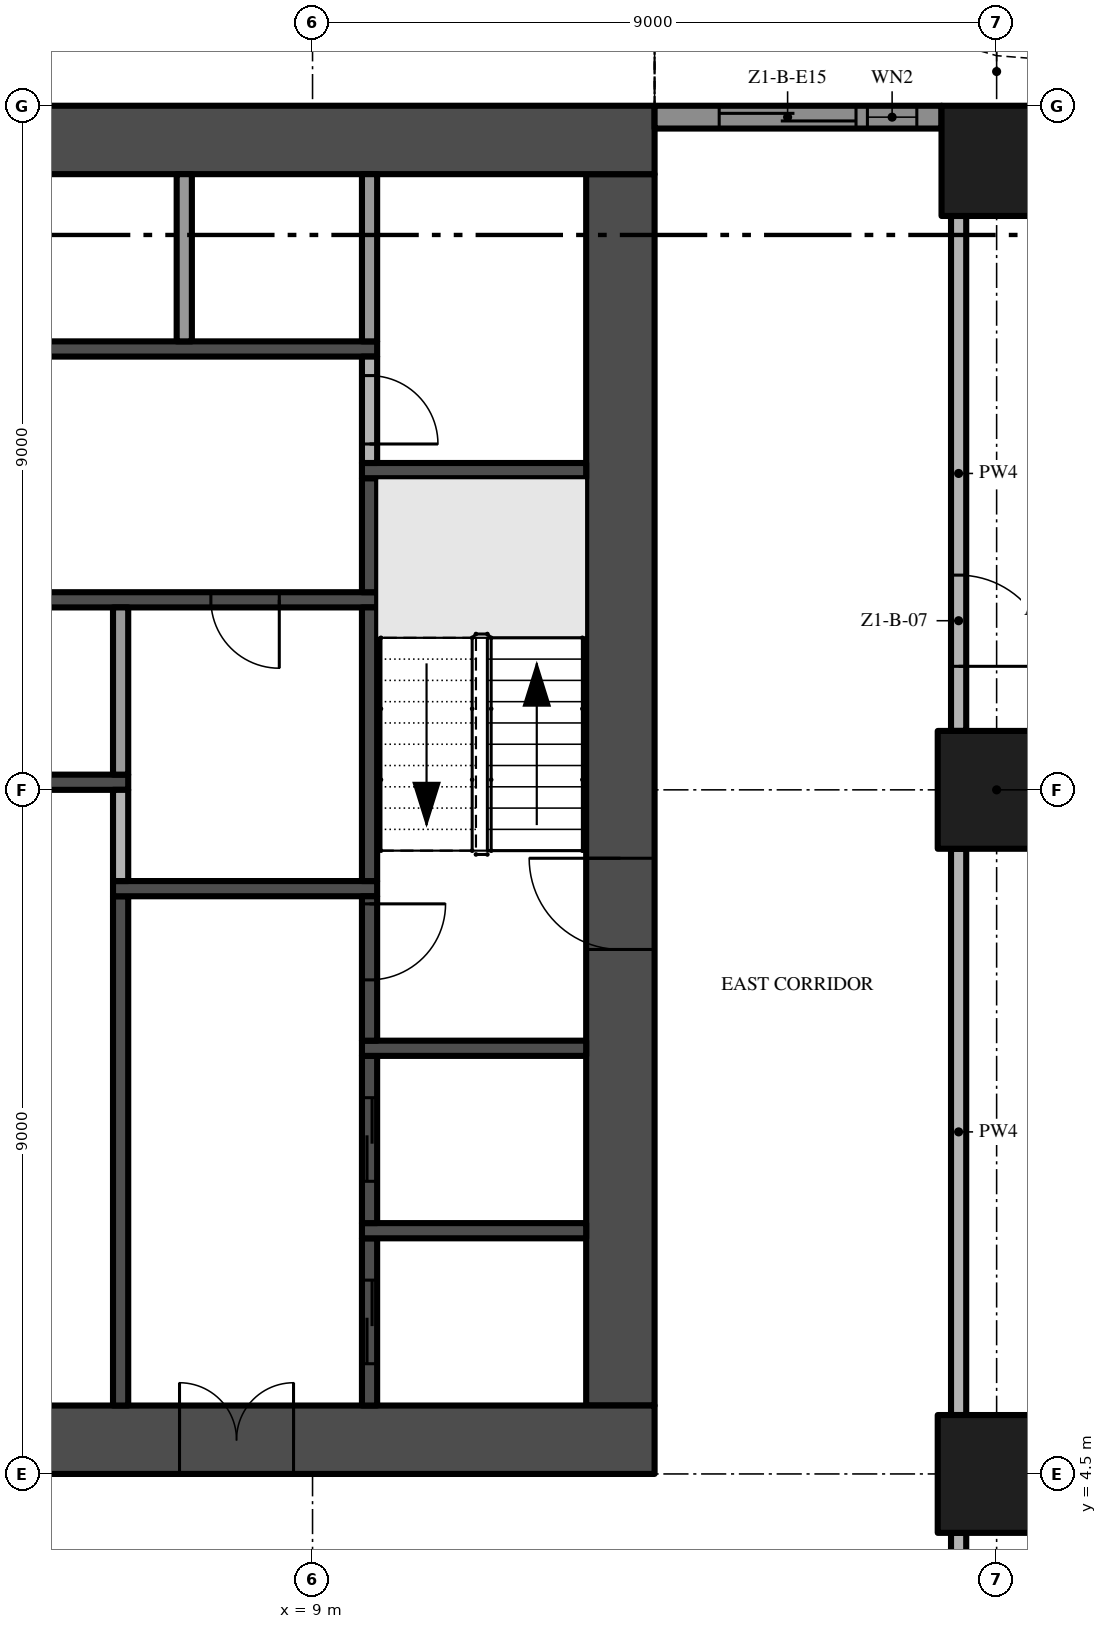
"""IFC4 building model, lengths in metres.
Left out: names, types, materials, properties, quantities, classifications, styles, units other than length and angle.
Written with IfcOpenShell. Run it as: python <this file> out.ifc"""

import sys

from ifc_helpers import new_model, si_unit, direction, frame, frame_2d, origin, origin_2d, place, context, subcontext, project, spatial, polyline, rectangle, outline, extrude, element, fill, save


model = new_model("IFC4")
c1 = context("Model", 3, precision=1e-05, world=origin(), true_north=direction((0.0, 1.0)))
c2 = subcontext(c1, "Body", "Model", "MODEL_VIEW")
j1 = project(units=[si_unit("LENGTHUNIT", "METRE"), si_unit("PLANEANGLEUNIT", "RADIAN")], contexts=[c1])
p1 = place(None, origin())
s1 = spatial("IfcSite", under=j1, at=p1, CompositionType="ELEMENT")
p2 = place(p1, origin())
s2 = spatial("IfcBuilding", under=s1, at=p2, CompositionType="ELEMENT")
p3 = place(p2, frame((0.0, 0.0, 30.2)))
s3 = spatial("IfcBuildingStorey", under=s2, at=p3, CompositionType="ELEMENT", Elevation=30.2)
p4 = place(p3, frame((-13.5, 4.95, -0.3), z_axis=(0.0, 0.0, 1.0), x_axis=(1.0, 0.0, 0.0)))
e1 = element("IfcWall", 1, at=p4, inside=s3, PredefinedType="SHEAR", context=c2, shape_type="SweptSolid", body=[
    extrude(rectangle(XDim=27.0, YDim=0.9, at=frame_2d((13.5, 0.0))), origin(), (0.0, 0.0, 1.0), 3.8),
])
p5 = place(p4, frame((12.0, 0.0, 0.3)))
e2 = element("IfcOpeningElement", 2, at=p5, cuts=e1, PredefinedType="OPENING", context=c2, shape_type="SweptSolid", body=[
    extrude(rectangle(XDim=3.0, YDim=2.4, at=frame_2d((1.5, 1.2))), frame((0.0, 0.46, 0.0), z_axis=(0.0, -1.0, 0.0), x_axis=(1.0, 0.0, 0.0)), (0.0, 0.0, 1.0), 0.92),
])
p6 = place(p4, frame((4.9, 0.0, 0.3)))
e3 = element("IfcOpeningElement", 3, at=p6, cuts=e1, PredefinedType="OPENING", context=c2, shape_type="SweptSolid", body=[
    extrude(rectangle(XDim=1.2, YDim=2.2, at=frame_2d((0.6, 1.1))), frame((0.0, 0.46, 0.0), z_axis=(0.0, -1.0, 0.0), x_axis=(1.0, 0.0, 0.0)), (0.0, 0.0, 1.0), 0.92),
])
p7 = place(p4, frame((20.75, 0.0, 0.3)))
e4 = element("IfcOpeningElement", 4, at=p7, cuts=e1, PredefinedType="OPENING", context=c2, shape_type="SweptSolid", body=[
    extrude(rectangle(XDim=1.5, YDim=2.2, at=frame_2d((0.75, 1.1))), frame((0.0, 0.46, 0.0), z_axis=(0.0, -1.0, 0.0), x_axis=(1.0, 0.0, 0.0)), (0.0, 0.0, 1.0), 0.92),
])
p8 = place(p4, frame((17.4, 0.0, 0.3)))
e5 = element("IfcOpeningElement", 5, at=p8, cuts=e1, PredefinedType="OPENING", context=c2, shape_type="SweptSolid", body=[
    extrude(rectangle(XDim=1.2, YDim=2.2, at=frame_2d((0.6, 1.1))), frame((0.0, 0.46, 0.0), z_axis=(0.0, -1.0, 0.0), x_axis=(1.0, 0.0, 0.0)), (0.0, 0.0, 1.0), 0.92),
])
p9 = place(p3, frame((13.05, 5.4, -0.3), z_axis=(0.0, 0.0, 1.0), x_axis=(0.0, 1.0, 0.0)))
e6 = element("IfcWall", 6, at=p9, inside=s3, PredefinedType="SHEAR", context=c2, shape_type="SweptSolid", body=[
    extrude(rectangle(XDim=16.2, YDim=0.9, at=frame_2d((8.1, 0.0))), origin(), (0.0, 0.0, 1.0), 3.8),
])
p10 = place(p9, frame((6.0, 0.0, 0.3)))
e7 = element("IfcOpeningElement", 7, at=p10, cuts=e6, PredefinedType="OPENING", context=c2, shape_type="SweptSolid", body=[
    extrude(rectangle(XDim=1.2, YDim=2.2, at=frame_2d((0.6, 1.1))), frame((0.0, 0.46, 0.0), z_axis=(0.0, -1.0, 0.0), x_axis=(1.0, 0.0, 0.0)), (0.0, 0.0, 1.0), 0.92),
])
p11 = place(p3, frame((13.5, 22.05, -0.3), z_axis=(0.0, 0.0, 1.0), x_axis=(-1.0, 0.0, 0.0)))
e8 = element("IfcWall", 8, at=p11, inside=s3, PredefinedType="SHEAR", context=c2, shape_type="SweptSolid", body=[
    extrude(rectangle(XDim=27.0, YDim=0.9, at=frame_2d((13.5, 0.0))), origin(), (0.0, 0.0, 1.0), 3.8),
])
p12 = place(p3, frame((18.0, 13.5, 0.0), z_axis=(0.0, 0.0, 1.0), x_axis=(1.0, 0.0, 0.0)))
e9 = element("IfcColumn", 9, at=p12, inside=s3, PredefinedType="COLUMN", context=c2, shape_type="SweptSolid", body=[
    extrude(rectangle(XDim=1.55, YDim=1.55, at=origin_2d()), origin(), (0.0, 0.0, 1.0), 3.5),
])
p13 = place(p3, frame((18.0, 21.775, 0.0), z_axis=(0.0, 0.0, 1.0), x_axis=(1.0, 0.0, 0.0)))
e10 = element("IfcColumn", 10, at=p13, inside=s3, PredefinedType="COLUMN", context=c2, shape_type="SweptSolid", body=[
    extrude(rectangle(XDim=1.45, YDim=1.45, at=origin_2d()), origin(), (0.0, 0.0, 1.0), 3.5),
])
p14 = place(p3, frame((18.0, 4.5, 0.0), z_axis=(0.0, 0.0, 1.0), x_axis=(1.0, 0.0, 0.0)))
e11 = element("IfcColumn", 11, at=p14, inside=s3, PredefinedType="COLUMN", context=c2, shape_type="SweptSolid", body=[
    extrude(rectangle(XDim=1.55, YDim=1.55, at=origin_2d()), origin(), (0.0, 0.0, 1.0), 3.5),
])
p15 = place(p3, frame((13.5, 22.35, 0.0), z_axis=(0.0, 0.0, 1.0), x_axis=(1.0, 0.0, 0.0)))
e12 = element("IfcWall", 12, at=p15, inside=s3, PredefinedType="SOLIDWALL", context=c2, shape_type="SweptSolid", body=[
    extrude(rectangle(XDim=3.775, YDim=0.3, at=frame_2d((1.887, 0.0))), origin(), (0.0, 0.0, 1.0), 3.5),
])
p16 = place(p15, frame((2.8, 0.0, 0.45)))
e13 = element("IfcOpeningElement", 13, at=p16, cuts=e12, PredefinedType="OPENING", context=c2, shape_type="SweptSolid", body=[
    extrude(rectangle(XDim=0.65, YDim=2.65, at=frame_2d((0.325, 1.325))), frame((0.0, 0.16, 0.0), z_axis=(0.0, -1.0, 0.0), x_axis=(1.0, 0.0, 0.0)), (0.0, 0.0, 1.0), 0.32),
])
p17 = place(p15, frame((0.85, 0.0, 0.0)))
e14 = element("IfcOpeningElement", 14, at=p17, cuts=e12, PredefinedType="OPENING", context=c2, shape_type="SweptSolid", body=[
    extrude(rectangle(XDim=1.8, YDim=2.4, at=frame_2d((0.9, 1.2))), frame((0.0, 0.16, 0.0), z_axis=(0.0, -1.0, 0.0), x_axis=(1.0, 0.0, 0.0)), (0.0, 0.0, 1.0), 0.32),
])
p18 = place(p3, origin())
e15 = element("IfcWall", 15, at=p18, inside=s3, PredefinedType="USERDEFINED", context=c2, shape_type="SweptSolid", body=[
    extrude(outline(polyline([(22.5, 24.3), (21.0, 23.595), (19.5, 23.159), (18.75, 23.1), (18.0, 23.159), (16.5, 23.595), (15.0, 24.3), (13.5, 25.005), (13.394, 24.779), (14.894, 24.074), (16.411, 23.36), (17.955, 22.911), (18.75, 22.849), (19.545, 22.911), (21.089, 23.36), (22.606, 24.074), (22.5, 24.3)])), origin(), (0.0, 0.0, 1.0), 0.9),
])
p19 = place(p3, frame((-9.85, 19.3, 0.0), z_axis=(0.0, 0.0, 1.0), x_axis=(1.0, 0.0, 0.0)))
e16 = element("IfcWall", 16, at=p19, inside=s3, PredefinedType="SHEAR", context=c2, shape_type="SweptSolid", body=[
    extrude(rectangle(XDim=19.7, YDim=0.2, at=frame_2d((9.85, 0.0))), origin(), (0.0, 0.0, 1.0), 3.5),
])
p20 = place(p19, frame((0.769, 0.0, 0.0)))
e17 = element("IfcOpeningElement", 17, at=p20, cuts=e16, PredefinedType="OPENING", context=c2, shape_type="SweptSolid", body=[
    extrude(rectangle(XDim=1.1, YDim=2.1, at=frame_2d((0.55, 1.05))), frame((0.0, 0.11, 0.0), z_axis=(0.0, -1.0, 0.0), x_axis=(1.0, 0.0, 0.0)), (0.0, 0.0, 1.0), 0.22),
])
p21 = place(p19, frame((3.206, 0.0, 0.0)))
e18 = element("IfcOpeningElement", 18, at=p21, cuts=e16, PredefinedType="OPENING", context=c2, shape_type="SweptSolid", body=[
    extrude(rectangle(XDim=1.1, YDim=2.1, at=frame_2d((0.55, 1.05))), frame((0.0, 0.11, 0.0), z_axis=(0.0, -1.0, 0.0), x_axis=(1.0, 0.0, 0.0)), (0.0, 0.0, 1.0), 0.22),
])
p22 = place(p19, frame((5.644, 0.0, 0.0)))
e19 = element("IfcOpeningElement", 19, at=p22, cuts=e16, PredefinedType="OPENING", context=c2, shape_type="SweptSolid", body=[
    extrude(rectangle(XDim=1.1, YDim=2.1, at=frame_2d((0.55, 1.05))), frame((0.0, 0.11, 0.0), z_axis=(0.0, -1.0, 0.0), x_axis=(1.0, 0.0, 0.0)), (0.0, 0.0, 1.0), 0.22),
])
p23 = place(p19, frame((8.081, 0.0, 0.0)))
e20 = element("IfcOpeningElement", 20, at=p23, cuts=e16, PredefinedType="OPENING", context=c2, shape_type="SweptSolid", body=[
    extrude(rectangle(XDim=1.1, YDim=2.1, at=frame_2d((0.55, 1.05))), frame((0.0, 0.11, 0.0), z_axis=(0.0, -1.0, 0.0), x_axis=(1.0, 0.0, 0.0)), (0.0, 0.0, 1.0), 0.22),
])
p24 = place(p3, frame((1.5, 13.6, 0.0), z_axis=(0.0, 0.0, 1.0), x_axis=(1.0, 0.0, 0.0)))
e21 = element("IfcWall", 21, at=p24, inside=s3, PredefinedType="SHEAR", context=c2, shape_type="SweptSolid", body=[
    extrude(rectangle(XDim=5.075, YDim=0.2, at=frame_2d((2.538, 0.0))), origin(), (0.0, 0.0, 1.0), 3.5),
])
p25 = place(p3, frame((9.85, 16.0, 0.0), z_axis=(0.0, 0.0, 1.0), x_axis=(-1.0, 0.0, 0.0)))
e22 = element("IfcWall", 22, at=p25, inside=s3, PredefinedType="SHEAR", context=c2, shape_type="SweptSolid", body=[
    extrude(rectangle(XDim=8.35, YDim=0.2, at=frame_2d((4.175, 0.0))), origin(), (0.0, 0.0, 1.0), 3.5),
])
p26 = place(p25, frame((1.288, 0.0, 0.0)))
e23 = element("IfcOpeningElement", 23, at=p26, cuts=e22, PredefinedType="OPENING", context=c2, shape_type="SweptSolid", body=[
    extrude(rectangle(XDim=0.9, YDim=2.1, at=frame_2d((0.45, 1.05))), frame((0.0, 0.11, 0.0), z_axis=(0.0, -1.0, 0.0), x_axis=(1.0, 0.0, 0.0)), (0.0, 0.0, 1.0), 0.22),
])
p27 = place(p3, frame((6.475, 5.4, 0.0), z_axis=(0.0, 0.0, 1.0), x_axis=(0.0, 1.0, 0.0)))
e24 = element("IfcWall", 24, at=p27, inside=s3, PredefinedType="SHEAR", context=c2, shape_type="SweptSolid", body=[
    extrude(rectangle(XDim=6.7, YDim=0.2, at=frame_2d((3.35, 0.0))), origin(), (0.0, 0.0, 1.0), 3.5),
])
p28 = place(p3, frame((6.375, 12.2, 0.0), z_axis=(0.0, 0.0, 1.0), x_axis=(1.0, 0.0, 0.0)))
e25 = element("IfcWall", 25, at=p28, inside=s3, PredefinedType="SHEAR", context=c2, shape_type="SweptSolid", body=[
    extrude(rectangle(XDim=3.475, YDim=0.2, at=frame_2d((1.738, 0.0))), origin(), (0.0, 0.0, 1.0), 3.5),
])
p29 = place(p3, frame((6.475, 12.3, 0.0), z_axis=(0.0, 0.0, 1.0), x_axis=(0.0, 1.0, 0.0)))
e26 = element("IfcWall", 26, at=p29, inside=s3, PredefinedType="PARTITIONING", context=c2, shape_type="SweptSolid", body=[
    extrude(rectangle(XDim=1.2, YDim=0.2, at=frame_2d((0.6, 0.0))), origin(), (0.0, 0.0, 1.0), 3.5),
])
for number, where, z_axis, x_axis in (
    (27, (6.475, 13.7, 0.0), (0.0, 0.0, 1.0), (0.0, 1.0, 0.0)),
    (28, (7.312, 19.4, 0.0), (0.0, 0.0, 1.0), (0.0, 1.0, 0.0)),
):
    element("IfcWall", number, at=place(p3, frame(where, z_axis=z_axis, x_axis=x_axis)), inside=s3, PredefinedType="PARTITIONING", context=c2, shape_type="SweptSolid", body=[
        extrude(rectangle(XDim=2.2, YDim=0.2, at=frame_2d((1.1, 0.0))), origin(), (0.0, 0.0, 1.0), 3.5),
    ])
p30 = place(p3, frame((9.75, 5.4, 0.0), z_axis=(0.0, 0.0, 1.0), x_axis=(0.0, 1.0, 0.0)))
e29 = element("IfcWall", 29, at=p30, inside=s3, PredefinedType="SHEAR", context=c2, shape_type="SweptSolid", body=[
    extrude(rectangle(XDim=2.2, YDim=0.2, at=frame_2d((1.1, 0.0))), origin(), (0.0, 0.0, 1.0), 3.5),
])
p31 = place(p30, frame((0.55, 0.0, 0.0)))
e30 = element("IfcOpeningElement", 30, at=p31, cuts=e29, PredefinedType="OPENING", context=c2, shape_type="SweptSolid", body=[
    extrude(rectangle(XDim=1.1, YDim=2.1, at=frame_2d((0.55, 1.05))), frame((0.0, 0.11, 0.0), z_axis=(0.0, -1.0, 0.0), x_axis=(1.0, 0.0, 0.0)), (0.0, 0.0, 1.0), 0.22),
])
p32 = place(p3, frame((9.65, 7.7, 0.0), z_axis=(0.0, 0.0, 1.0), x_axis=(1.0, 0.0, 0.0)))
e31 = element("IfcWall", 31, at=p32, inside=s3, PredefinedType="SHEAR", context=c2, shape_type="SweptSolid", body=[
    extrude(rectangle(XDim=2.95, YDim=0.2, at=frame_2d((1.475, 0.0))), origin(), (0.0, 0.0, 1.0), 3.5),
])
p33 = place(p3, frame((9.75, 7.8, 0.0), z_axis=(0.0, 0.0, 1.0), x_axis=(0.0, 1.0, 0.0)))
e32 = element("IfcWall", 32, at=p33, inside=s3, PredefinedType="SHEAR", context=c2, shape_type="SweptSolid", body=[
    extrude(rectangle(XDim=2.2, YDim=0.2, at=frame_2d((1.1, 0.0))), origin(), (0.0, 0.0, 1.0), 3.5),
])
p34 = place(p33, frame((0.55, 0.0, 0.0)))
e33 = element("IfcOpeningElement", 33, at=p34, cuts=e32, PredefinedType="OPENING", context=c2, shape_type="SweptSolid", body=[
    extrude(rectangle(XDim=1.1, YDim=2.1, at=frame_2d((0.55, 1.05))), frame((0.0, 0.11, 0.0), z_axis=(0.0, -1.0, 0.0), x_axis=(1.0, 0.0, 0.0)), (0.0, 0.0, 1.0), 0.22),
])
p35 = place(p3, frame((9.65, 10.1, 0.0), z_axis=(0.0, 0.0, 1.0), x_axis=(1.0, 0.0, 0.0)))
e34 = element("IfcWall", 34, at=p35, inside=s3, PredefinedType="SHEAR", context=c2, shape_type="SweptSolid", body=[
    extrude(rectangle(XDim=2.95, YDim=0.2, at=frame_2d((1.475, 0.0))), origin(), (0.0, 0.0, 1.0), 3.5),
])
p36 = place(p3, frame((9.75, 12.1, 0.0), z_axis=(0.0, 0.0, 1.0), x_axis=(0.0, -1.0, 0.0)))
e35 = element("IfcWall", 35, at=p36, inside=s3, PredefinedType="SHEAR", context=c2, shape_type="SweptSolid", body=[
    extrude(rectangle(XDim=1.9, YDim=0.2, at=frame_2d((0.95, 0.0))), origin(), (0.0, 0.0, 1.0), 3.5),
])
p37 = place(p36, frame((0.1, 0.0, 0.0)))
e36 = element("IfcOpeningElement", 36, at=p37, cuts=e35, PredefinedType="OPENING", context=c2, shape_type="SweptSolid", body=[
    extrude(rectangle(XDim=1.0, YDim=2.2, at=frame_2d((0.5, 1.1))), frame((0.0, 0.11, 0.0), z_axis=(0.0, -1.0, 0.0), x_axis=(1.0, 0.0, 0.0)), (0.0, 0.0, 1.0), 0.22),
])
p38 = place(p3, frame((9.75, 12.3, 0.0), z_axis=(0.0, 0.0, 1.0), x_axis=(0.0, 1.0, 0.0)))
e37 = element("IfcWall", 37, at=p38, inside=s3, PredefinedType="SHEAR", context=c2, shape_type="SweptSolid", body=[
    extrude(rectangle(XDim=3.6, YDim=0.2, at=frame_2d((1.8, 0.0))), origin(), (0.0, 0.0, 1.0), 3.5),
])
p39 = place(p3, frame((9.75, 16.1, 0.0), z_axis=(0.0, 0.0, 1.0), x_axis=(0.0, 1.0, 0.0)))
e38 = element("IfcWall", 38, at=p39, inside=s3, PredefinedType="SHEAR", context=c2, shape_type="SweptSolid", body=[
    extrude(rectangle(XDim=1.5, YDim=0.2, at=frame_2d((0.75, 0.0))), origin(), (0.0, 0.0, 1.0), 3.5),
])
p40 = place(p3, frame((9.65, 17.7, 0.0), z_axis=(0.0, 0.0, 1.0), x_axis=(1.0, 0.0, 0.0)))
e39 = element("IfcWall", 39, at=p40, inside=s3, PredefinedType="SHEAR", context=c2, shape_type="SweptSolid", body=[
    extrude(rectangle(XDim=2.95, YDim=0.2, at=frame_2d((1.475, 0.0))), origin(), (0.0, 0.0, 1.0), 3.5),
])
p41 = place(p3, frame((9.75, 19.2, 0.0), z_axis=(0.0, 0.0, 1.0), x_axis=(0.0, -1.0, 0.0)))
e40 = element("IfcWall", 40, at=p41, inside=s3, PredefinedType="PARTITIONING", context=c2, shape_type="SweptSolid", body=[
    extrude(rectangle(XDim=1.4, YDim=0.2, at=frame_2d((0.7, 0.0))), origin(), (0.0, 0.0, 1.0), 3.5),
])
p42 = place(p41, frame((0.25, 0.0, 0.0)))
e41 = element("IfcOpeningElement", 41, at=p42, cuts=e40, PredefinedType="OPENING", context=c2, shape_type="SweptSolid", body=[
    extrude(rectangle(XDim=0.9, YDim=2.1, at=frame_2d((0.45, 1.05))), frame((0.0, 0.11, 0.0), z_axis=(0.0, -1.0, 0.0), x_axis=(1.0, 0.0, 0.0)), (0.0, 0.0, 1.0), 0.22),
])
p43 = place(p3, frame((9.75, 19.4, 0.0), z_axis=(0.0, 0.0, 1.0), x_axis=(0.0, 1.0, 0.0)))
e42 = element("IfcWall", 42, at=p43, inside=s3, PredefinedType="PARTITIONING", context=c2, shape_type="SweptSolid", body=[
    extrude(rectangle(XDim=2.2, YDim=0.2, at=frame_2d((1.1, 0.0))), origin(), (0.0, 0.0, 1.0), 3.5),
])
p44 = place(p3, frame((17.5, -0.2, 0.0), z_axis=(0.0, 0.0, 1.0), x_axis=(0.0, 1.0, 0.0)))
e43 = element("IfcWall", 43, at=p44, inside=s3, PredefinedType="PARTITIONING", context=c2, shape_type="SweptSolid", body=[
    extrude(rectangle(XDim=3.925, YDim=0.2, at=frame_2d((1.962, 0.0))), origin(), (0.0, 0.0, 1.0), 3.5),
])
p45 = place(p3, frame((17.5, 5.275, 0.0), z_axis=(0.0, 0.0, 1.0), x_axis=(0.0, 1.0, 0.0)))
e44 = element("IfcWall", 44, at=p45, inside=s3, PredefinedType="PARTITIONING", context=c2, shape_type="SweptSolid", body=[
    extrude(rectangle(XDim=7.45, YDim=0.2, at=frame_2d((3.725, 0.0))), origin(), (0.0, 0.0, 1.0), 3.5),
])
p46 = place(p3, frame((17.5, 21.05, 0.0), z_axis=(0.0, 0.0, 1.0), x_axis=(0.0, -1.0, 0.0)))
e45 = element("IfcWall", 45, at=p46, inside=s3, PredefinedType="PARTITIONING", context=c2, shape_type="SweptSolid", body=[
    extrude(rectangle(XDim=6.775, YDim=0.2, at=frame_2d((3.388, 0.0))), origin(), (0.0, 0.0, 1.0), 3.5),
])
p47 = place(p46, frame((4.725, 0.0, 0.0)))
e46 = element("IfcOpeningElement", 46, at=p47, cuts=e45, PredefinedType="OPENING", context=c2, shape_type="SweptSolid", body=[
    extrude(rectangle(XDim=1.2, YDim=2.4, at=frame_2d((0.6, 1.2))), frame((0.0, 0.11, 0.0), z_axis=(0.0, -1.0, 0.0), x_axis=(1.0, 0.0, 0.0)), (0.0, 0.0, 1.0), 0.22),
])
p48 = place(p16, origin())
e47 = element("IfcWindow", 47, at=p48, inside=s3, PartitioningType="SINGLE_PANEL", PredefinedType="WINDOW", context=c2, shape_type="SweptSolid", body=[
    extrude(rectangle(XDim=0.65, YDim=2.65, at=frame_2d((0.325, 1.325))), frame((0.0, 0.03, 0.0), z_axis=(0.0, -1.0, 0.0), x_axis=(1.0, 0.0, 0.0)), (0.0, 0.0, 1.0), 0.06),
])
fill(e13, e47)
p49 = place(p17, origin())
e48 = element("IfcDoor", 48, at=p49, inside=s3, OperationType="SINGLE_SWING_LEFT", PredefinedType="DOOR", context=c2, shape_type="SweptSolid", body=[
    extrude(rectangle(XDim=1.8, YDim=2.4, at=frame_2d((0.9, 1.2))), frame((0.0, 0.025, 0.0), z_axis=(0.0, -1.0, 0.0), x_axis=(1.0, 0.0, 0.0)), (0.0, 0.0, 1.0), 0.05),
])
fill(e14, e48)
p50 = place(p10, frame((1.2, 0.0, 0.0), z_axis=(0.0, 0.0, 1.0), x_axis=(-1.0, 0.0, 0.0)))
e49 = element("IfcDoor", 49, at=p50, inside=s3, OperationType="SINGLE_SWING_LEFT", PredefinedType="DOOR", context=c2, shape_type="SweptSolid", body=[
    extrude(rectangle(XDim=1.2, YDim=2.2, at=frame_2d((0.6, 1.1))), frame((0.0, 0.025, 0.0), z_axis=(0.0, -1.0, 0.0), x_axis=(1.0, 0.0, 0.0)), (0.0, 0.0, 1.0), 0.05),
])
fill(e7, e49)
p51 = place(p7, frame((1.5, 0.0, 0.0), z_axis=(0.0, 0.0, 1.0), x_axis=(-1.0, 0.0, 0.0)))
e50 = element("IfcDoor", 50, at=p51, inside=s3, OperationType="DOUBLE_DOOR_SINGLE_SWING", PredefinedType="DOOR", context=c2, shape_type="SweptSolid", body=[
    extrude(rectangle(XDim=1.5, YDim=2.2, at=frame_2d((0.75, 1.1))), frame((0.0, 0.025, 0.0), z_axis=(0.0, -1.0, 0.0), x_axis=(1.0, 0.0, 0.0)), (0.0, 0.0, 1.0), 0.05),
])
fill(e4, e50)
p52 = place(p37, origin())
e51 = element("IfcDoor", 51, at=p52, inside=s3, OperationType="SINGLE_SWING_LEFT", PredefinedType="DOOR", context=c2, shape_type="SweptSolid", body=[
    extrude(rectangle(XDim=1.0, YDim=2.2, at=frame_2d((0.5, 1.1))), frame((0.0, 0.025, 0.0), z_axis=(0.0, -1.0, 0.0), x_axis=(1.0, 0.0, 0.0)), (0.0, 0.0, 1.0), 0.05),
])
fill(e36, e51)
p53 = place(p31, origin())
e52 = element("IfcDoor", 52, at=p53, inside=s3, OperationType="SLIDING_TO_RIGHT", PredefinedType="DOOR", context=c2, shape_type="SweptSolid", body=[
    extrude(rectangle(XDim=1.1, YDim=2.1, at=frame_2d((0.55, 1.05))), frame((0.0, 0.025, 0.0), z_axis=(0.0, -1.0, 0.0), x_axis=(1.0, 0.0, 0.0)), (0.0, 0.0, 1.0), 0.05),
])
fill(e30, e52)
p54 = place(p34, origin())
e53 = element("IfcDoor", 53, at=p54, inside=s3, OperationType="SLIDING_TO_RIGHT", PredefinedType="DOOR", context=c2, shape_type="SweptSolid", body=[
    extrude(rectangle(XDim=1.1, YDim=2.1, at=frame_2d((0.55, 1.05))), frame((0.0, 0.025, 0.0), z_axis=(0.0, -1.0, 0.0), x_axis=(1.0, 0.0, 0.0)), (0.0, 0.0, 1.0), 0.05),
])
fill(e33, e53)
p55 = place(p26, origin())
e54 = element("IfcDoor", 54, at=p55, inside=s3, OperationType="SINGLE_SWING_LEFT", PredefinedType="DOOR", context=c2, shape_type="SweptSolid", body=[
    extrude(rectangle(XDim=0.9, YDim=2.1, at=frame_2d((0.45, 1.05))), frame((0.0, 0.025, 0.0), z_axis=(0.0, -1.0, 0.0), x_axis=(1.0, 0.0, 0.0)), (0.0, 0.0, 1.0), 0.05),
])
fill(e23, e54)
p56 = place(p42, origin())
e55 = element("IfcDoor", 55, at=p56, inside=s3, OperationType="SINGLE_SWING_RIGHT", PredefinedType="DOOR", context=c2, shape_type="SweptSolid", body=[
    extrude(rectangle(XDim=0.9, YDim=2.1, at=frame_2d((0.45, 1.05))), frame((0.0, 0.025, 0.0), z_axis=(0.0, -1.0, 0.0), x_axis=(1.0, 0.0, 0.0)), (0.0, 0.0, 1.0), 0.05),
])
fill(e41, e55)
p57 = place(p47, origin())
e56 = element("IfcDoor", 56, at=p57, inside=s3, OperationType="SINGLE_SWING_RIGHT", PredefinedType="DOOR", context=c2, shape_type="SweptSolid", body=[
    extrude(rectangle(XDim=1.2, YDim=2.4, at=frame_2d((0.6, 1.2))), frame((0.0, 0.025, 0.0), z_axis=(0.0, -1.0, 0.0), x_axis=(1.0, 0.0, 0.0)), (0.0, 0.0, 1.0), 0.05),
])
fill(e46, e56)
save(model, sys.argv[1])
